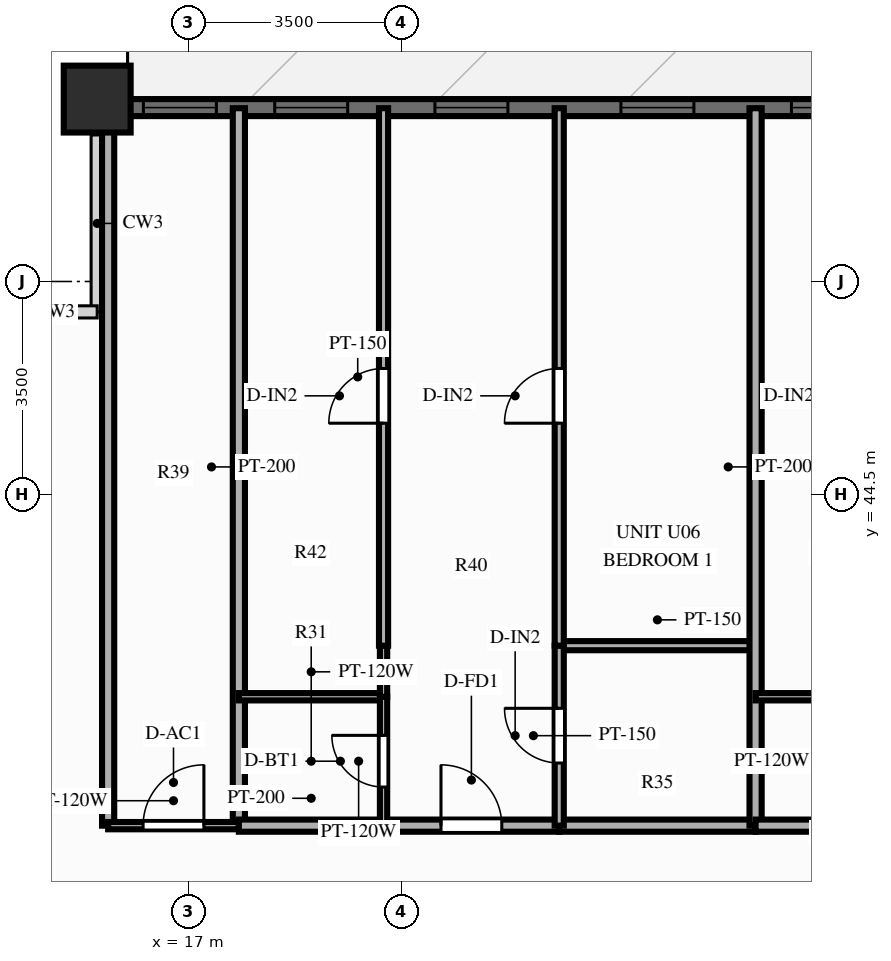
"""IFC4 building model, lengths in metres.
Left out: names, types, materials, properties, quantities, classifications, styles, units other than length and angle.
Written with IfcOpenShell. Run it as: python <this file> out.ifc"""

import sys

from ifc_helpers import new_model, si_unit, direction, frame, frame_2d, origin, origin_2d, place, context, subcontext, project, spatial, rectangle, extrude, source, transform, mapped, element, fill, save


model = new_model("IFC4")
c1 = context("Model", 3, precision=1e-05, world=origin(), true_north=direction((0.0, 1.0)))
c2 = subcontext(c1, "Body", "Model", "MODEL_VIEW")
j1 = project(units=[si_unit("LENGTHUNIT", "METRE"), si_unit("PLANEANGLEUNIT", "RADIAN")], contexts=[c1])
p1 = place(None, origin())
s1 = spatial("IfcSite", under=j1, at=p1, CompositionType="ELEMENT")
p2 = place(p1, origin())
s2 = spatial("IfcBuilding", under=s1, at=p2, CompositionType="ELEMENT")
p3 = place(p2, frame((0.0, 0.0, 61.4)))
s3 = spatial("IfcBuildingStorey", under=s2, at=p3, CompositionType="ELEMENT", Elevation=61.4)
m1 = source(origin(), c2, "Body", "SweptSolid", [
    extrude(rectangle(XDim=1.1, YDim=1.1, at=origin_2d()), origin(), (0.0, 0.0, 1.0), 3.0),
])
p4 = place(p3, frame((15.5, 51.0, 0.0), z_axis=(0.0, 0.0, 1.0), x_axis=(1.0, 0.0, 0.0)))
e1 = element("IfcColumn", 1, at=p4, inside=s3, PredefinedType="COLUMN", context=c2, shape_type="MappedRepresentation", body=[
    mapped(m1, transform((0.0, 0.0, 0.0), scale=1.0)),
])
p5 = place(p3, frame((15.5, 50.86, 0.0), z_axis=(0.0, 0.0, 1.0), x_axis=(1.0, 0.0, 0.0)))
e2 = element("IfcWall", 2, at=p5, inside=s3, PredefinedType="SOLIDWALL", context=c2, shape_type="SweptSolid", body=[
    extrude(rectangle(XDim=45.0, YDim=0.28, at=frame_2d((22.5, 0.0))), origin(), (0.0, 0.0, 1.0), 2.28),
])
p6 = place(p5, frame((0.76, 0.0, 0.25)))
e3 = element("IfcOpeningElement", 3, at=p6, cuts=e2, PredefinedType="OPENING", context=c2, shape_type="SweptSolid", body=[
    extrude(rectangle(XDim=1.2, YDim=1.5, at=frame_2d((0.6, 0.75))), frame((0.0, 0.152, 0.0), z_axis=(0.0, -1.0, 0.0), x_axis=(1.0, 0.0, 0.0)), (0.0, 0.0, 1.0), 0.304),
])
p7 = place(p5, frame((2.92, 0.0, 0.25)))
e4 = element("IfcOpeningElement", 4, at=p7, cuts=e2, PredefinedType="OPENING", context=c2, shape_type="SweptSolid", body=[
    extrude(rectangle(XDim=1.2, YDim=1.5, at=frame_2d((0.6, 0.75))), frame((0.0, 0.152, 0.0), z_axis=(0.0, -1.0, 0.0), x_axis=(1.0, 0.0, 0.0)), (0.0, 0.0, 1.0), 0.304),
])
p8 = place(p5, frame((5.554, 0.0, 0.25)))
e5 = element("IfcOpeningElement", 5, at=p8, cuts=e2, PredefinedType="OPENING", context=c2, shape_type="SweptSolid", body=[
    extrude(rectangle(XDim=1.2, YDim=1.5, at=frame_2d((0.6, 0.75))), frame((0.0, 0.152, 0.0), z_axis=(0.0, -1.0, 0.0), x_axis=(1.0, 0.0, 0.0)), (0.0, 0.0, 1.0), 0.304),
])
p9 = place(p5, frame((8.613, 0.0, 0.25)))
e6 = element("IfcOpeningElement", 6, at=p9, cuts=e2, PredefinedType="OPENING", context=c2, shape_type="SweptSolid", body=[
    extrude(rectangle(XDim=1.2, YDim=1.5, at=frame_2d((0.6, 0.75))), frame((0.0, 0.152, 0.0), z_axis=(0.0, -1.0, 0.0), x_axis=(1.0, 0.0, 0.0)), (0.0, 0.0, 1.0), 0.304),
])
p10 = place(p5, frame((11.418, 0.0, 0.25)))
e7 = element("IfcOpeningElement", 7, at=p10, cuts=e2, PredefinedType="OPENING", context=c2, shape_type="SweptSolid", body=[
    extrude(rectangle(XDim=1.2, YDim=1.5, at=frame_2d((0.6, 0.75))), frame((0.0, 0.152, 0.0), z_axis=(0.0, -1.0, 0.0), x_axis=(1.0, 0.0, 0.0)), (0.0, 0.0, 1.0), 0.304),
])
p11 = place(p5, frame((13.809, 0.0, 0.25)))
e8 = element("IfcOpeningElement", 8, at=p11, cuts=e2, PredefinedType="OPENING", context=c2, shape_type="SweptSolid", body=[
    extrude(rectangle(XDim=1.2, YDim=1.5, at=frame_2d((0.6, 0.75))), frame((0.0, 0.152, 0.0), z_axis=(0.0, -1.0, 0.0), x_axis=(1.0, 0.0, 0.0)), (0.0, 0.0, 1.0), 0.304),
])
p12 = place(p5, frame((17.258, 0.0, 0.25)))
e9 = element("IfcOpeningElement", 9, at=p12, cuts=e2, PredefinedType="OPENING", context=c2, shape_type="SweptSolid", body=[
    extrude(rectangle(XDim=1.2, YDim=1.5, at=frame_2d((0.6, 0.75))), frame((0.0, 0.152, 0.0), z_axis=(0.0, -1.0, 0.0), x_axis=(1.0, 0.0, 0.0)), (0.0, 0.0, 1.0), 0.304),
])
p13 = place(p5, frame((20.101, 0.0, 0.25)))
e10 = element("IfcOpeningElement", 10, at=p13, cuts=e2, PredefinedType="OPENING", context=c2, shape_type="SweptSolid", body=[
    extrude(rectangle(XDim=1.2, YDim=1.5, at=frame_2d((0.6, 0.75))), frame((0.0, 0.152, 0.0), z_axis=(0.0, -1.0, 0.0), x_axis=(1.0, 0.0, 0.0)), (0.0, 0.0, 1.0), 0.304),
])
p14 = place(p5, frame((24.793, 0.0, 0.0)))
e11 = element("IfcOpeningElement", 11, at=p14, cuts=e2, PredefinedType="OPENING", context=c2, shape_type="SweptSolid", body=[
    extrude(rectangle(XDim=1.1, YDim=2.15, at=frame_2d((0.55, 1.075))), frame((0.0, 0.152, 0.0), z_axis=(0.0, -1.0, 0.0), x_axis=(1.0, 0.0, 0.0)), (0.0, 0.0, 1.0), 0.304),
])
p15 = place(p5, frame((31.021, 0.0, 0.25)))
e12 = element("IfcOpeningElement", 12, at=p15, cuts=e2, PredefinedType="OPENING", context=c2, shape_type="SweptSolid", body=[
    extrude(rectangle(XDim=1.2, YDim=1.5, at=frame_2d((0.6, 0.75))), frame((0.0, 0.152, 0.0), z_axis=(0.0, -1.0, 0.0), x_axis=(1.0, 0.0, 0.0)), (0.0, 0.0, 1.0), 0.304),
])
p16 = place(p5, frame((33.869, 0.0, 0.25)))
e13 = element("IfcOpeningElement", 13, at=p16, cuts=e2, PredefinedType="OPENING", context=c2, shape_type="SweptSolid", body=[
    extrude(rectangle(XDim=1.2, YDim=1.5, at=frame_2d((0.6, 0.75))), frame((0.0, 0.152, 0.0), z_axis=(0.0, -1.0, 0.0), x_axis=(1.0, 0.0, 0.0)), (0.0, 0.0, 1.0), 0.304),
])
p17 = place(p5, frame((37.98, 0.0, 0.25)))
e14 = element("IfcOpeningElement", 14, at=p17, cuts=e2, PredefinedType="OPENING", context=c2, shape_type="SweptSolid", body=[
    extrude(rectangle(XDim=1.2, YDim=1.5, at=frame_2d((0.6, 0.75))), frame((0.0, 0.152, 0.0), z_axis=(0.0, -1.0, 0.0), x_axis=(1.0, 0.0, 0.0)), (0.0, 0.0, 1.0), 0.304),
])
p18 = place(p5, frame((42.277, 0.0, 0.25)))
e15 = element("IfcOpeningElement", 15, at=p18, cuts=e2, PredefinedType="OPENING", context=c2, shape_type="SweptSolid", body=[
    extrude(rectangle(XDim=1.2, YDim=1.5, at=frame_2d((0.6, 0.75))), frame((0.0, 0.152, 0.0), z_axis=(0.0, -1.0, 0.0), x_axis=(1.0, 0.0, 0.0)), (0.0, 0.0, 1.0), 0.304),
])
for number, where, z_axis, x_axis in (
    (16, (15.68, 39.05, 0.0), (0.0, 0.0, 1.0), (0.0, 1.0, 0.0)),
    (17, (17.83, 39.05, 0.0), (0.0, 0.0, 1.0), (0.0, 1.0, 0.0)),
):
    element("IfcWall", number, at=place(p3, frame(where, z_axis=z_axis, x_axis=x_axis)), inside=s3, PredefinedType="PARTITIONING", context=c2, shape_type="SweptSolid", body=[
        extrude(rectangle(XDim=11.8, YDim=0.2, at=frame_2d((5.9, 0.0))), origin(), (0.0, 0.0, 1.0), 2.79),
    ])
p19 = place(p3, frame((15.68, 39.05, 0.0), z_axis=(0.0, 0.0, 1.0), x_axis=(1.0, 0.0, 0.0)))
e18 = element("IfcWall", 18, at=p19, inside=s3, PredefinedType="PARTITIONING", context=c2, shape_type="SweptSolid", body=[
    extrude(rectangle(XDim=2.15, YDim=0.12, at=frame_2d((1.075, 0.0))), origin(), (0.0, 0.0, 1.0), 2.79),
])
p20 = place(p19, frame((0.575, 0.0, 0.0)))
e19 = element("IfcOpeningElement", 19, at=p20, cuts=e18, PredefinedType="OPENING", context=c2, shape_type="SweptSolid", body=[
    extrude(rectangle(XDim=1.0, YDim=2.1, at=frame_2d((0.5, 1.05))), frame((0.0, 0.072, 0.0), z_axis=(0.0, -1.0, 0.0), x_axis=(1.0, 0.0, 0.0)), (0.0, 0.0, 1.0), 0.144),
])
p21 = place(p3, frame((17.83, 39.05, 0.0), z_axis=(0.0, 0.0, 1.0), x_axis=(1.0, 0.0, 0.0)))
e20 = element("IfcWall", 20, at=p21, inside=s3, PredefinedType="PARTITIONING", context=c2, shape_type="SweptSolid", body=[
    extrude(rectangle(XDim=2.379, YDim=0.2, at=frame_2d((1.19, 0.0))), origin(), (0.0, 0.0, 1.0), 2.79),
])
p22 = place(p3, frame((20.209, 39.05, 0.0), z_axis=(0.0, 0.0, 1.0), x_axis=(1.0, 0.0, 0.0)))
e21 = element("IfcWall", 21, at=p22, inside=s3, PredefinedType="PARTITIONING", context=c2, shape_type="SweptSolid", body=[
    extrude(rectangle(XDim=2.889, YDim=0.2, at=frame_2d((1.445, 0.0))), origin(), (0.0, 0.0, 1.0), 2.79),
])
p23 = place(p22, frame((0.945, 0.0, 0.0)))
e22 = element("IfcOpeningElement", 22, at=p23, cuts=e21, PredefinedType="OPENING", context=c2, shape_type="SweptSolid", body=[
    extrude(rectangle(XDim=1.0, YDim=2.15, at=frame_2d((0.5, 1.075))), frame((0.0, 0.112, 0.0), z_axis=(0.0, -1.0, 0.0), x_axis=(1.0, 0.0, 0.0)), (0.0, 0.0, 1.0), 0.224),
])
p24 = place(p3, frame((23.099, 39.05, 0.0), z_axis=(0.0, 0.0, 1.0), x_axis=(1.0, 0.0, 0.0)))
e23 = element("IfcWall", 23, at=p24, inside=s3, PredefinedType="PARTITIONING", context=c2, shape_type="SweptSolid", body=[
    extrude(rectangle(XDim=3.229, YDim=0.2, at=frame_2d((1.615, 0.0))), origin(), (0.0, 0.0, 1.0), 2.79),
])
p25 = place(p3, frame((17.83, 41.17, 0.0), z_axis=(0.0, 0.0, 1.0), x_axis=(1.0, 0.0, 0.0)))
e24 = element("IfcWall", 24, at=p25, inside=s3, PredefinedType="PARTITIONING", context=c2, shape_type="SweptSolid", body=[
    extrude(rectangle(XDim=2.379, YDim=0.12, at=frame_2d((1.19, 0.0))), origin(), (0.0, 0.0, 1.0), 2.79),
])
p26 = place(p3, frame((23.099, 42.01, 0.0), z_axis=(0.0, 0.0, 1.0), x_axis=(1.0, 0.0, 0.0)))
e25 = element("IfcWall", 25, at=p26, inside=s3, PredefinedType="PARTITIONING", context=c2, shape_type="SweptSolid", body=[
    extrude(rectangle(XDim=3.229, YDim=0.15, at=frame_2d((1.615, 0.0))), origin(), (0.0, 0.0, 1.0), 2.79),
])
p27 = place(p3, frame((20.209, 39.05, 0.0), z_axis=(0.0, 0.0, 1.0), x_axis=(0.0, 1.0, 0.0)))
e26 = element("IfcWall", 26, at=p27, inside=s3, PredefinedType="PARTITIONING", context=c2, shape_type="SweptSolid", body=[
    extrude(rectangle(XDim=2.12, YDim=0.12, at=frame_2d((1.06, 0.0))), origin(), (0.0, 0.0, 1.0), 2.79),
])
p28 = place(p27, frame((0.635, 0.0, 0.0)))
e27 = element("IfcOpeningElement", 27, at=p28, cuts=e26, PredefinedType="OPENING", context=c2, shape_type="SweptSolid", body=[
    extrude(rectangle(XDim=0.85, YDim=2.05, at=frame_2d((0.425, 1.025))), frame((0.0, 0.072, 0.0), z_axis=(0.0, -1.0, 0.0), x_axis=(1.0, 0.0, 0.0)), (0.0, 0.0, 1.0), 0.144),
])
p29 = place(p3, frame((20.209, 41.17, 0.0), z_axis=(0.0, 0.0, 1.0), x_axis=(0.0, 1.0, 0.0)))
e28 = element("IfcWall", 28, at=p29, inside=s3, PredefinedType="PARTITIONING", context=c2, shape_type="SweptSolid", body=[
    extrude(rectangle(XDim=0.84, YDim=0.12, at=frame_2d((0.42, 0.0))), origin(), (0.0, 0.0, 1.0), 2.79),
])
p30 = place(p3, frame((20.209, 42.01, 0.0), z_axis=(0.0, 0.0, 1.0), x_axis=(0.0, 1.0, 0.0)))
e29 = element("IfcWall", 29, at=p30, inside=s3, PredefinedType="PARTITIONING", context=c2, shape_type="SweptSolid", body=[
    extrude(rectangle(XDim=8.84, YDim=0.15, at=frame_2d((4.42, 0.0))), origin(), (0.0, 0.0, 1.0), 2.79),
])
p31 = place(p30, frame((3.659, 0.0, 0.0)))
e30 = element("IfcOpeningElement", 30, at=p31, cuts=e29, PredefinedType="OPENING", context=c2, shape_type="SweptSolid", body=[
    extrude(rectangle(XDim=0.9, YDim=2.1, at=frame_2d((0.45, 1.05))), frame((0.0, 0.087, 0.0), z_axis=(0.0, -1.0, 0.0), x_axis=(1.0, 0.0, 0.0)), (0.0, 0.0, 1.0), 0.174),
])
p32 = place(p3, frame((23.099, 39.05, 0.0), z_axis=(0.0, 0.0, 1.0), x_axis=(0.0, 1.0, 0.0)))
e31 = element("IfcWall", 31, at=p32, inside=s3, PredefinedType="PARTITIONING", context=c2, shape_type="SweptSolid", body=[
    extrude(rectangle(XDim=2.96, YDim=0.15, at=frame_2d((1.48, 0.0))), origin(), (0.0, 0.0, 1.0), 2.79),
])
p33 = place(p32, frame((1.03, 0.0, 0.0)))
e32 = element("IfcOpeningElement", 32, at=p33, cuts=e31, PredefinedType="OPENING", context=c2, shape_type="SweptSolid", body=[
    extrude(rectangle(XDim=0.9, YDim=2.1, at=frame_2d((0.45, 1.05))), frame((0.0, 0.087, 0.0), z_axis=(0.0, -1.0, 0.0), x_axis=(1.0, 0.0, 0.0)), (0.0, 0.0, 1.0), 0.174),
])
p34 = place(p3, frame((23.099, 42.01, 0.0), z_axis=(0.0, 0.0, 1.0), x_axis=(0.0, 1.0, 0.0)))
e33 = element("IfcWall", 33, at=p34, inside=s3, PredefinedType="PARTITIONING", context=c2, shape_type="SweptSolid", body=[
    extrude(rectangle(XDim=8.84, YDim=0.15, at=frame_2d((4.42, 0.0))), origin(), (0.0, 0.0, 1.0), 2.79),
])
p35 = place(p34, frame((3.659, 0.0, 0.0)))
e34 = element("IfcOpeningElement", 34, at=p35, cuts=e33, PredefinedType="OPENING", context=c2, shape_type="SweptSolid", body=[
    extrude(rectangle(XDim=0.9, YDim=2.1, at=frame_2d((0.45, 1.05))), frame((0.0, 0.087, 0.0), z_axis=(0.0, -1.0, 0.0), x_axis=(1.0, 0.0, 0.0)), (0.0, 0.0, 1.0), 0.174),
])
p36 = place(p3, frame((26.328, 39.05, 0.0), z_axis=(0.0, 0.0, 1.0), x_axis=(0.0, 1.0, 0.0)))
e35 = element("IfcWall", 35, at=p36, inside=s3, PredefinedType="PARTITIONING", context=c2, shape_type="SweptSolid", body=[
    extrude(rectangle(XDim=11.8, YDim=0.2, at=frame_2d((5.9, 0.0))), origin(), (0.0, 0.0, 1.0), 2.79),
])
p37 = place(p3, frame((26.328, 39.05, 0.0), z_axis=(0.0, 0.0, 1.0), x_axis=(1.0, 0.0, 0.0)))
e36 = element("IfcWall", 36, at=p37, inside=s3, PredefinedType="PARTITIONING", context=c2, shape_type="SweptSolid", body=[
    extrude(rectangle(XDim=2.38, YDim=0.2, at=frame_2d((1.19, 0.0))), origin(), (0.0, 0.0, 1.0), 2.79),
])
p38 = place(p3, frame((26.328, 41.17, 0.0), z_axis=(0.0, 0.0, 1.0), x_axis=(1.0, 0.0, 0.0)))
e37 = element("IfcWall", 37, at=p38, inside=s3, PredefinedType="PARTITIONING", context=c2, shape_type="SweptSolid", body=[
    extrude(rectangle(XDim=2.38, YDim=0.12, at=frame_2d((1.19, 0.0))), origin(), (0.0, 0.0, 1.0), 2.79),
])
m2 = source(origin(), c2, "Body", "SweptSolid", [
    extrude(rectangle(XDim=1.2, YDim=1.5, at=frame_2d((0.6, 0.75))), frame((0.0, 0.03, 0.0), z_axis=(0.0, -1.0, 0.0), x_axis=(1.0, 0.0, 0.0)), (0.0, 0.0, 1.0), 0.06),
])
p39 = place(p6, origin())
e38 = element("IfcWindow", 38, at=p39, inside=s3, PartitioningType="SINGLE_PANEL", PredefinedType="WINDOW", context=c2, shape_type="MappedRepresentation", body=[
    mapped(m2, transform((0.0, 0.0, 0.0), scale=1.0)),
])
fill(e3, e38)
p40 = place(p7, origin())
e39 = element("IfcWindow", 39, at=p40, inside=s3, PartitioningType="SINGLE_PANEL", PredefinedType="WINDOW", context=c2, shape_type="MappedRepresentation", body=[
    mapped(m2, transform((0.0, 0.0, 0.0), scale=1.0)),
])
fill(e4, e39)
p41 = place(p8, origin())
e40 = element("IfcWindow", 40, at=p41, inside=s3, PartitioningType="SINGLE_PANEL", PredefinedType="WINDOW", context=c2, shape_type="MappedRepresentation", body=[
    mapped(m2, transform((0.0, 0.0, 0.0), scale=1.0)),
])
fill(e5, e40)
p42 = place(p9, origin())
e41 = element("IfcWindow", 41, at=p42, inside=s3, PartitioningType="SINGLE_PANEL", PredefinedType="WINDOW", context=c2, shape_type="MappedRepresentation", body=[
    mapped(m2, transform((0.0, 0.0, 0.0), scale=1.0)),
])
fill(e6, e41)
p43 = place(p10, origin())
e42 = element("IfcWindow", 42, at=p43, inside=s3, PartitioningType="SINGLE_PANEL", PredefinedType="WINDOW", context=c2, shape_type="MappedRepresentation", body=[
    mapped(m2, transform((0.0, 0.0, 0.0), scale=1.0)),
])
fill(e7, e42)
m3 = source(origin(), c2, "Body", "SweptSolid", [
    extrude(rectangle(XDim=1.0, YDim=2.1, at=frame_2d((0.5, 1.05))), frame((0.0, 0.025, 0.0), z_axis=(0.0, -1.0, 0.0), x_axis=(1.0, 0.0, 0.0)), (0.0, 0.0, 1.0), 0.05),
])
p44 = place(p20, origin())
e43 = element("IfcDoor", 43, at=p44, inside=s3, OperationType="SINGLE_SWING_RIGHT", PredefinedType="DOOR", context=c2, shape_type="MappedRepresentation", body=[
    mapped(m3, transform((0.0, 0.0, 0.0), scale=1.0)),
])
fill(e19, e43)
m4 = source(origin(), c2, "Body", "SweptSolid", [
    extrude(rectangle(XDim=1.0, YDim=2.15, at=frame_2d((0.5, 1.075))), frame((0.0, 0.025, 0.0), z_axis=(0.0, -1.0, 0.0), x_axis=(1.0, 0.0, 0.0)), (0.0, 0.0, 1.0), 0.05),
])
p45 = place(p23, origin())
e44 = element("IfcDoor", 44, at=p45, inside=s3, OperationType="SINGLE_SWING_LEFT", PredefinedType="DOOR", context=c2, shape_type="MappedRepresentation", body=[
    mapped(m4, transform((0.0, 0.0, 0.0), scale=1.0)),
])
fill(e22, e44)
m5 = source(origin(), c2, "Body", "SweptSolid", [
    extrude(rectangle(XDim=0.85, YDim=2.05, at=frame_2d((0.425, 1.025))), frame((0.0, 0.025, 0.0), z_axis=(0.0, -1.0, 0.0), x_axis=(1.0, 0.0, 0.0)), (0.0, 0.0, 1.0), 0.05),
])
p46 = place(p28, origin())
e45 = element("IfcDoor", 45, at=p46, inside=s3, OperationType="SINGLE_SWING_RIGHT", PredefinedType="DOOR", context=c2, shape_type="MappedRepresentation", body=[
    mapped(m5, transform((0.0, 0.0, 0.0), scale=1.0)),
])
fill(e27, e45)
m6 = source(origin(), c2, "Body", "SweptSolid", [
    extrude(rectangle(XDim=0.9, YDim=2.1, at=frame_2d((0.45, 1.05))), frame((0.0, 0.025, 0.0), z_axis=(0.0, -1.0, 0.0), x_axis=(1.0, 0.0, 0.0)), (0.0, 0.0, 1.0), 0.05),
])
p47 = place(p31, origin())
e46 = element("IfcDoor", 46, at=p47, inside=s3, OperationType="SINGLE_SWING_LEFT", PredefinedType="DOOR", context=c2, shape_type="MappedRepresentation", body=[
    mapped(m6, transform((0.0, 0.0, 0.0), scale=1.0)),
])
fill(e30, e46)
p48 = place(p33, origin())
e47 = element("IfcDoor", 47, at=p48, inside=s3, OperationType="SINGLE_SWING_RIGHT", PredefinedType="DOOR", context=c2, shape_type="MappedRepresentation", body=[
    mapped(m6, transform((0.0, 0.0, 0.0), scale=1.0)),
])
fill(e32, e47)
p49 = place(p35, origin())
e48 = element("IfcDoor", 48, at=p49, inside=s3, OperationType="SINGLE_SWING_LEFT", PredefinedType="DOOR", context=c2, shape_type="MappedRepresentation", body=[
    mapped(m6, transform((0.0, 0.0, 0.0), scale=1.0)),
])
fill(e34, e48)
save(model, sys.argv[1])
